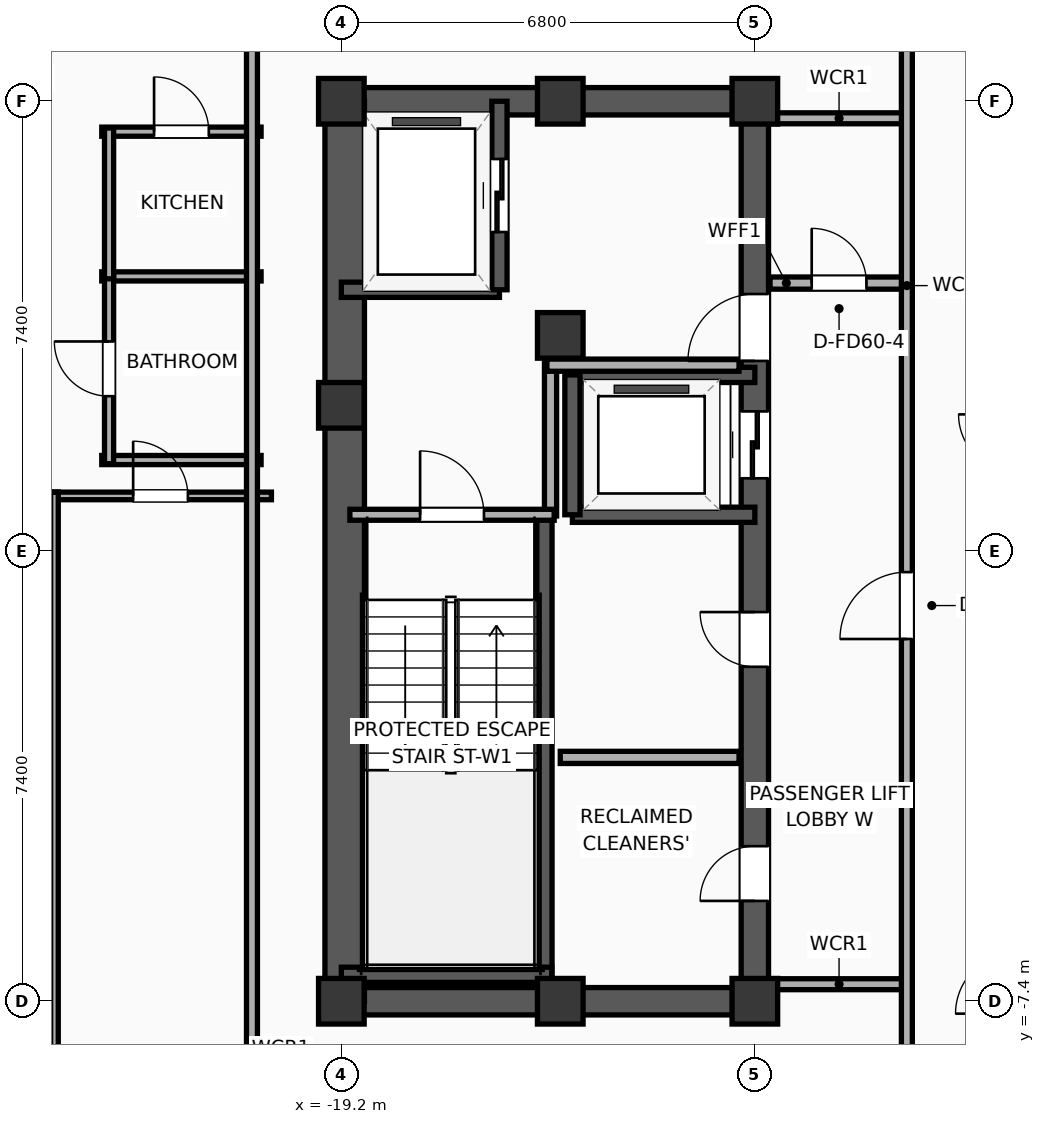
"""IFC4 building model, lengths in metres.
Left out: names, types, materials, properties, quantities, classifications, styles, units other than length and angle.
Written with IfcOpenShell. Run it as: python <this file> out.ifc"""

import sys

from ifc_helpers import new_model, si_unit, direction, frame, frame_2d, origin, origin_2d, place, context, subcontext, project, spatial, rectangle, extrude, element, fill, save


model = new_model("IFC4")
c1 = context("Model", 3, precision=1e-05, world=origin(), true_north=direction((0.0, 1.0)))
c2 = subcontext(c1, "Body", "Model", "MODEL_VIEW")
j1 = project(units=[si_unit("LENGTHUNIT", "METRE"), si_unit("PLANEANGLEUNIT", "RADIAN")], contexts=[c1])
p1 = place(None, origin())
s1 = spatial("IfcSite", under=j1, at=p1, CompositionType="ELEMENT")
p2 = place(p1, origin())
s2 = spatial("IfcBuilding", under=s1, at=p2, CompositionType="ELEMENT")
p3 = place(p2, frame((0.0, 0.0, 291.2)))
s3 = spatial("IfcBuildingStorey", under=s2, at=p3, CompositionType="ELEMENT", Elevation=291.2)
for number, where, z_axis, x_axis in (
    (1, (-19.2, -7.4, 0.0), (0.0, 0.0, 1.0), (1.0, 0.0, 0.0)),
    (2, (-19.2, 2.4, 0.0), (0.0, 0.0, 1.0), (1.0, 0.0, 0.0)),
    (3, (-19.2, 7.4, 0.0), (0.0, 0.0, 1.0), (1.0, 0.0, 0.0)),
    (4, (-15.6, -7.4, 0.0), (0.0, 0.0, 1.0), (1.0, 0.0, 0.0)),
    (5, (-15.6, 7.4, 0.0), (0.0, 0.0, 1.0), (1.0, 0.0, 0.0)),
    (6, (-12.4, -7.4, 0.0), (0.0, 0.0, 1.0), (1.0, 0.0, 0.0)),
    (7, (-15.6, 3.55, 0.0), (0.0, 0.0, 1.0), (1.0, 0.0, 0.0)),
    (8, (-12.4, 7.4, 0.0), (0.0, 0.0, 1.0), (1.0, 0.0, 0.0)),
):
    element("IfcColumn", number, at=place(p3, frame(where, z_axis=z_axis, x_axis=x_axis)), inside=s3, PredefinedType="COLUMN", context=c2, shape_type="SweptSolid", body=[
        extrude(rectangle(XDim=0.75, YDim=0.75, at=origin_2d()), origin(), (0.0, 0.0, 1.0), 3.9),
    ])
for number, where, z_axis, x_axis in (
    (9, (-19.425, -7.4, 0.0), (0.0, 0.0, 1.0), (1.0, 0.0, 0.0)),
    (10, (-19.425, 7.4, 0.0), (0.0, 0.0, 1.0), (1.0, 0.0, 0.0)),
):
    element("IfcWall", number, at=place(p3, frame(where, z_axis=z_axis, x_axis=x_axis)), inside=s3, PredefinedType="SHEAR", context=c2, shape_type="SweptSolid", body=[
        extrude(rectangle(XDim=7.25, YDim=0.45, at=frame_2d((3.625, 0.0))), origin(), (0.0, 0.0, 1.0), 3.635),
    ])
p4 = place(p3, frame((-19.145, -7.4, 0.0), z_axis=(0.0, 0.0, 1.0), x_axis=(0.0, 1.0, 0.0)))
e11 = element("IfcWall", 11, at=p4, inside=s3, PredefinedType="SHEAR", context=c2, shape_type="SweptSolid", body=[
    extrude(rectangle(XDim=14.8, YDim=0.65, at=frame_2d((7.4, 0.0))), origin(), (0.0, 0.0, 1.0), 3.635),
])
p5 = place(p3, frame((-12.4, -7.4, 0.0), z_axis=(0.0, 0.0, 1.0), x_axis=(0.0, 1.0, 0.0)))
e12 = element("IfcWall", 12, at=p5, inside=s3, PredefinedType="SHEAR", context=c2, shape_type="SweptSolid", body=[
    extrude(rectangle(XDim=14.8, YDim=0.45, at=frame_2d((7.4, 0.0))), origin(), (0.0, 0.0, 1.0), 3.635),
])
p6 = place(p5, frame((8.6, 0.0, 0.0)))
e13 = element("IfcOpeningElement", 13, at=p6, cuts=e12, PredefinedType="OPENING", context=c2, shape_type="SweptSolid", body=[
    extrude(rectangle(XDim=1.1, YDim=2.05, at=frame_2d((0.55, 1.025))), frame((0.0, 0.235, 0.0), z_axis=(0.0, -1.0, 0.0), x_axis=(1.0, 0.0, 0.0)), (0.0, 0.0, 1.0), 0.47),
])
p7 = place(p5, frame((10.53, 0.0, 0.0)))
e14 = element("IfcOpeningElement", 14, at=p7, cuts=e12, PredefinedType="OPENING", context=c2, shape_type="SweptSolid", body=[
    extrude(rectangle(XDim=1.1, YDim=2.05, at=frame_2d((0.55, 1.025))), frame((0.0, 0.235, 0.0), z_axis=(0.0, -1.0, 0.0), x_axis=(1.0, 0.0, 0.0)), (0.0, 0.0, 1.0), 0.47),
])
p8 = place(p5, frame((1.65, 0.0, 0.0)))
e15 = element("IfcOpeningElement", 15, at=p8, cuts=e12, PredefinedType="OPENING", context=c2, shape_type="SweptSolid", body=[
    extrude(rectangle(XDim=0.9, YDim=2.05, at=frame_2d((0.45, 1.025))), frame((0.0, 0.235, 0.0), z_axis=(0.0, -1.0, 0.0), x_axis=(1.0, 0.0, 0.0)), (0.0, 0.0, 1.0), 0.47),
])
p9 = place(p5, frame((5.5, 0.0, 0.0)))
e16 = element("IfcOpeningElement", 16, at=p9, cuts=e12, PredefinedType="OPENING", context=c2, shape_type="SweptSolid", body=[
    extrude(rectangle(XDim=0.9, YDim=2.05, at=frame_2d((0.45, 1.025))), frame((0.0, 0.235, 0.0), z_axis=(0.0, -1.0, 0.0), x_axis=(1.0, 0.0, 0.0)), (0.0, 0.0, 1.0), 0.47),
])
p10 = place(p3, frame((-15.86, -7.085, 0.0), z_axis=(0.0, 0.0, 1.0), x_axis=(0.0, 1.0, 0.0)))
e17 = element("IfcWall", 17, at=p10, inside=s3, PredefinedType="SOLIDWALL", context=c2, shape_type="SweptSolid", body=[
    extrude(rectangle(XDim=7.685, YDim=0.25, at=frame_2d((3.843, 0.0))), origin(), (0.0, 0.0, 1.0), 3.635),
])
p11 = place(p3, frame((-19.2, -6.965, 0.0), z_axis=(0.0, 0.0, 1.0), x_axis=(1.0, 0.0, 0.0)))
e18 = element("IfcWall", 18, at=p11, inside=s3, PredefinedType="SOLIDWALL", context=c2, shape_type="SweptSolid", body=[
    extrude(rectangle(XDim=3.46, YDim=0.25, at=frame_2d((1.73, 0.0))), origin(), (0.0, 0.0, 1.0), 3.635),
])
p12 = place(p3, frame((-19.2, 4.3, 0.0), z_axis=(0.0, 0.0, 1.0), x_axis=(1.0, 0.0, 0.0)))
e19 = element("IfcWall", 19, at=p12, inside=s3, PredefinedType="SOLIDWALL", context=c2, shape_type="SweptSolid", body=[
    extrude(rectangle(XDim=2.6, YDim=0.25, at=frame_2d((1.3, 0.0))), origin(), (0.0, 0.0, 1.0), 3.635),
])
p13 = place(p3, frame((-16.6, 4.3, 0.0), z_axis=(0.0, 0.0, 1.0), x_axis=(0.0, 1.0, 0.0)))
e20 = element("IfcWall", 20, at=p13, inside=s3, PredefinedType="SOLIDWALL", context=c2, shape_type="SweptSolid", body=[
    extrude(rectangle(XDim=3.1, YDim=0.25, at=frame_2d((1.55, 0.0))), origin(), (0.0, 0.0, 1.0), 3.635),
])
p14 = place(p13, frame((0.95, 0.0, 0.0)))
e21 = element("IfcOpeningElement", 21, at=p14, cuts=e20, PredefinedType="OPENING", context=c2, shape_type="SweptSolid", body=[
    extrude(rectangle(XDim=1.2, YDim=2.05, at=frame_2d((0.6, 1.025))), frame((0.0, 0.135, 0.0), z_axis=(0.0, -1.0, 0.0), x_axis=(1.0, 0.0, 0.0)), (0.0, 0.0, 1.0), 0.27),
])
for number, where, z_axis, x_axis in (
    (22, (-15.4, 0.6, 0.0), (0.0, 0.0, 1.0), (1.0, 0.0, 0.0)),
    (23, (-12.4, 2.9, 0.0), (0.0, 0.0, 1.0), (-1.0, 0.0, 0.0)),
):
    element("IfcWall", number, at=place(p3, frame(where, z_axis=z_axis, x_axis=x_axis)), inside=s3, PredefinedType="SOLIDWALL", context=c2, shape_type="SweptSolid", body=[
        extrude(rectangle(XDim=3.0, YDim=0.25, at=frame_2d((1.5, 0.0))), origin(), (0.0, 0.0, 1.0), 3.635),
    ])
p15 = place(p3, frame((-15.4, 2.9, 0.0), z_axis=(0.0, 0.0, 1.0), x_axis=(0.0, -1.0, 0.0)))
e24 = element("IfcWall", 24, at=p15, inside=s3, PredefinedType="SOLIDWALL", context=c2, shape_type="SweptSolid", body=[
    extrude(rectangle(XDim=2.3, YDim=0.25, at=frame_2d((1.15, 0.0))), origin(), (0.0, 0.0, 1.0), 3.635),
])
p16 = place(p3, frame((-15.76, 0.58, 0.0), z_axis=(0.0, 0.0, 1.0), x_axis=(0.0, 1.0, 0.0)))
e25 = element("IfcWall", 25, at=p16, inside=s3, PredefinedType="PARTITIONING", context=c2, shape_type="SweptSolid", body=[
    extrude(rectangle(XDim=2.52, YDim=0.2, at=frame_2d((1.26, 0.0))), origin(), (0.0, 0.0, 1.0), 3.635),
])
p17 = place(p3, frame((-15.82, 3.06, 0.0), z_axis=(0.0, 0.0, 1.0), x_axis=(1.0, 0.0, 0.0)))
e26 = element("IfcWall", 26, at=p17, inside=s3, PredefinedType="PARTITIONING", context=c2, shape_type="SweptSolid", body=[
    extrude(rectangle(XDim=3.16, YDim=0.2, at=frame_2d((1.58, 0.0))), origin(), (0.0, 0.0, 1.0), 3.635),
])
p18 = place(p3, frame((-19.06, 0.6, 0.0), z_axis=(0.0, 0.0, 1.0), x_axis=(1.0, 0.0, 0.0)))
e27 = element("IfcWall", 27, at=p18, inside=s3, PredefinedType="PARTITIONING", context=c2, shape_type="SweptSolid", body=[
    extrude(rectangle(XDim=3.36, YDim=0.18, at=frame_2d((1.68, 0.0))), origin(), (0.0, 0.0, 1.0), 3.635),
])
p19 = place(p18, frame((1.155, 0.0, 0.0)))
e28 = element("IfcOpeningElement", 28, at=p19, cuts=e27, PredefinedType="OPENING", context=c2, shape_type="SweptSolid", body=[
    extrude(rectangle(XDim=1.05, YDim=2.05, at=frame_2d((0.525, 1.025))), frame((0.0, 0.1, 0.0), z_axis=(0.0, -1.0, 0.0), x_axis=(1.0, 0.0, 0.0)), (0.0, 0.0, 1.0), 0.2),
])
p20 = place(p3, frame((-15.6, -3.39, 0.0), z_axis=(0.0, 0.0, 1.0), x_axis=(1.0, 0.0, 0.0)))
e29 = element("IfcWall", 29, at=p20, inside=s3, PredefinedType="PARTITIONING", context=c2, shape_type="SweptSolid", body=[
    extrude(rectangle(XDim=2.94, YDim=0.2, at=frame_2d((1.47, 0.0))), origin(), (0.0, 0.0, 1.0), 3.635),
])
p21 = place(p3, frame((-12.15, 4.41, 0.0), z_axis=(0.0, 0.0, 1.0), x_axis=(1.0, 0.0, 0.0)))
e30 = element("IfcWall", 30, at=p21, inside=s3, PredefinedType="PARTITIONING", context=c2, shape_type="SweptSolid", body=[
    extrude(rectangle(XDim=2.27, YDim=0.2, at=frame_2d((1.135, 0.0))), origin(), (0.0, 0.0, 1.0), 3.635),
])
p22 = place(p21, frame((0.685, 0.0, 0.0)))
e31 = element("IfcOpeningElement", 31, at=p22, cuts=e30, PredefinedType="OPENING", context=c2, shape_type="SweptSolid", body=[
    extrude(rectangle(XDim=0.9, YDim=2.05, at=frame_2d((0.45, 1.025))), frame((0.0, 0.11, 0.0), z_axis=(0.0, -1.0, 0.0), x_axis=(1.0, 0.0, 0.0)), (0.0, 0.0, 1.0), 0.22),
])
for number, where, z_axis, x_axis in (
    (32, (-12.15, 7.12, 0.0), (0.0, 0.0, 1.0), (1.0, 0.0, 0.0)),
    (33, (-12.15, -7.12, 0.0), (0.0, 0.0, 1.0), (1.0, 0.0, 0.0)),
):
    element("IfcWall", number, at=place(p3, frame(where, z_axis=z_axis, x_axis=x_axis)), inside=s3, PredefinedType="PARTITIONING", context=c2, shape_type="SweptSolid", body=[
        extrude(rectangle(XDim=2.27, YDim=0.18, at=frame_2d((1.135, 0.0))), origin(), (0.0, 0.0, 1.0), 3.635),
    ])
p23 = place(p3, frame((-9.9, -8.93, 0.0), z_axis=(0.0, 0.0, 1.0), x_axis=(0.0, 1.0, 0.0)))
e34 = element("IfcWall", 34, at=p23, inside=s3, PredefinedType="PARTITIONING", context=c2, shape_type="SweptSolid", body=[
    extrude(rectangle(XDim=17.86, YDim=0.18, at=frame_2d((8.93, 0.0))), origin(), (0.0, 0.0, 1.0), 3.635),
])
p24 = place(p23, frame((7.487, 0.0, 0.0)))
e35 = element("IfcOpeningElement", 35, at=p24, cuts=e34, PredefinedType="OPENING", context=c2, shape_type="SweptSolid", body=[
    extrude(rectangle(XDim=1.1, YDim=2.05, at=frame_2d((0.55, 1.025))), frame((0.0, 0.1, 0.0), z_axis=(0.0, -1.0, 0.0), x_axis=(1.0, 0.0, 0.0)), (0.0, 0.0, 1.0), 0.2),
])
p25 = place(p3, frame((-23.14, 6.9, 0.0), z_axis=(0.0, 0.0, 1.0), x_axis=(1.0, 0.0, 0.0)))
e36 = element("IfcWall", 36, at=p25, inside=s3, PredefinedType="PLUMBINGWALL", context=c2, shape_type="SweptSolid", body=[
    extrude(rectangle(XDim=2.62, YDim=0.15, at=frame_2d((1.31, 0.0))), origin(), (0.0, 0.0, 1.0), 3.635),
])
p26 = place(p25, frame((0.86, 0.0, 0.0)))
e37 = element("IfcOpeningElement", 37, at=p26, cuts=e36, PredefinedType="OPENING", context=c2, shape_type="SweptSolid", body=[
    extrude(rectangle(XDim=0.9, YDim=2.05, at=frame_2d((0.45, 1.025))), frame((0.0, 0.085, 0.0), z_axis=(0.0, -1.0, 0.0), x_axis=(1.0, 0.0, 0.0)), (0.0, 0.0, 1.0), 0.17),
])
for number, where, z_axis, x_axis in (
    (38, (-23.14, 4.52, 0.0), (0.0, 0.0, 1.0), (1.0, 0.0, 0.0)),
    (39, (-23.14, 1.5, 0.0), (0.0, 0.0, 1.0), (1.0, 0.0, 0.0)),
):
    element("IfcWall", number, at=place(p3, frame(where, z_axis=z_axis, x_axis=x_axis)), inside=s3, PredefinedType="PLUMBINGWALL", context=c2, shape_type="SweptSolid", body=[
        extrude(rectangle(XDim=2.62, YDim=0.15, at=frame_2d((1.31, 0.0))), origin(), (0.0, 0.0, 1.0), 3.635),
    ])
p27 = place(p3, frame((-23.02, 1.44, 0.0), z_axis=(0.0, 0.0, 1.0), x_axis=(0.0, 1.0, 0.0)))
e40 = element("IfcWall", 40, at=p27, inside=s3, PredefinedType="PLUMBINGWALL", context=c2, shape_type="SweptSolid", body=[
    extrude(rectangle(XDim=3.12, YDim=0.15, at=frame_2d((1.56, 0.0))), origin(), (0.0, 0.0, 1.0), 3.635),
])
p28 = place(p27, frame((1.11, 0.0, 0.0)))
e41 = element("IfcOpeningElement", 41, at=p28, cuts=e40, PredefinedType="OPENING", context=c2, shape_type="SweptSolid", body=[
    extrude(rectangle(XDim=0.9, YDim=2.05, at=frame_2d((0.45, 1.025))), frame((0.0, 0.085, 0.0), z_axis=(0.0, -1.0, 0.0), x_axis=(1.0, 0.0, 0.0)), (0.0, 0.0, 1.0), 0.17),
])
p29 = place(p3, frame((-23.02, 4.48, 0.0), z_axis=(0.0, 0.0, 1.0), x_axis=(0.0, 1.0, 0.0)))
e42 = element("IfcWall", 42, at=p29, inside=s3, PredefinedType="PLUMBINGWALL", context=c2, shape_type="SweptSolid", body=[
    extrude(rectangle(XDim=2.48, YDim=0.15, at=frame_2d((1.24, 0.0))), origin(), (0.0, 0.0, 1.0), 3.635),
])
p30 = place(p3, frame((-27.229, 0.91, 0.0), z_axis=(0.0, 0.0, 1.0), x_axis=(1.0, 0.0, 0.0)))
e43 = element("IfcWall", 43, at=p30, inside=s3, PredefinedType="PARTITIONING", context=c2, shape_type="SweptSolid", body=[
    extrude(rectangle(XDim=3.374, YDim=0.125, at=frame_2d((1.687, 0.0))), origin(), (0.0, 0.0, 1.0), 3.635),
])
p31 = place(p30, frame((1.237, 0.0, 0.0)))
e44 = element("IfcOpeningElement", 44, at=p31, cuts=e43, PredefinedType="OPENING", context=c2, shape_type="SweptSolid", body=[
    extrude(rectangle(XDim=0.9, YDim=2.05, at=frame_2d((0.45, 1.025))), frame((0.0, 0.073, 0.0), z_axis=(0.0, -1.0, 0.0), x_axis=(1.0, 0.0, 0.0)), (0.0, 0.0, 1.0), 0.145),
])
p32 = place(p3, frame((-23.98, 0.91, 0.0), z_axis=(0.0, 0.0, 1.0), x_axis=(1.0, 0.0, 0.0)))
e45 = element("IfcWall", 45, at=p32, inside=s3, PredefinedType="PARTITIONING", context=c2, shape_type="SweptSolid", body=[
    extrude(rectangle(XDim=3.63, YDim=0.125, at=frame_2d((1.815, 0.0))), origin(), (0.0, 0.0, 1.0), 3.635),
])
p33 = place(p32, frame((1.356, 0.0, 0.0)))
e46 = element("IfcOpeningElement", 46, at=p33, cuts=e45, PredefinedType="OPENING", context=c2, shape_type="SweptSolid", body=[
    extrude(rectangle(XDim=0.9, YDim=2.05, at=frame_2d((0.45, 1.025))), frame((0.0, 0.073, 0.0), z_axis=(0.0, -1.0, 0.0), x_axis=(1.0, 0.0, 0.0)), (0.0, 0.0, 1.0), 0.145),
])
p34 = place(p3, frame((-23.918, -9.16, 0.0), z_axis=(0.0, 0.0, 1.0), x_axis=(0.0, 1.0, 0.0)))
e47 = element("IfcWall", 47, at=p34, inside=s3, PredefinedType="PARTITIONING", context=c2, shape_type="SweptSolid", body=[
    extrude(rectangle(XDim=10.13, YDim=0.125, at=frame_2d((5.065, 0.0))), origin(), (0.0, 0.0, 1.0), 3.635),
])
p35 = place(p3, frame((-20.67, -8.96, 0.0), z_axis=(0.0, 0.0, 1.0), x_axis=(0.0, 1.0, 0.0)))
e48 = element("IfcWall", 48, at=p35, inside=s3, PredefinedType="PARTITIONING", context=c2, shape_type="SweptSolid", body=[
    extrude(rectangle(XDim=17.92, YDim=0.18, at=frame_2d((8.96, 0.0))), origin(), (0.0, 0.0, 1.0), 3.635),
])
p36 = place(p14, origin())
e49 = element("IfcDoor", 49, at=p36, inside=s3, OperationType="SLIDING_TO_LEFT", PredefinedType="DOOR", context=c2, shape_type="SweptSolid", body=[
    extrude(rectangle(XDim=1.2, YDim=2.05, at=frame_2d((0.6, 1.025))), frame((0.0, 0.025, 0.0), z_axis=(0.0, -1.0, 0.0), x_axis=(1.0, 0.0, 0.0)), (0.0, 0.0, 1.0), 0.05),
])
fill(e21, e49)
p37 = place(p6, origin())
e50 = element("IfcDoor", 50, at=p37, inside=s3, OperationType="SLIDING_TO_LEFT", PredefinedType="DOOR", context=c2, shape_type="SweptSolid", body=[
    extrude(rectangle(XDim=1.1, YDim=2.05, at=frame_2d((0.55, 1.025))), frame((0.0, 0.025, 0.0), z_axis=(0.0, -1.0, 0.0), x_axis=(1.0, 0.0, 0.0)), (0.0, 0.0, 1.0), 0.05),
])
fill(e13, e50)
p38 = place(p19, origin())
e51 = element("IfcDoor", 51, at=p38, inside=s3, OperationType="SINGLE_SWING_LEFT", PredefinedType="DOOR", context=c2, shape_type="SweptSolid", body=[
    extrude(rectangle(XDim=1.05, YDim=2.05, at=frame_2d((0.525, 1.025))), frame((0.0, 0.025, 0.0), z_axis=(0.0, -1.0, 0.0), x_axis=(1.0, 0.0, 0.0)), (0.0, 0.0, 1.0), 0.05),
])
fill(e28, e51)
p39 = place(p22, origin())
e52 = element("IfcDoor", 52, at=p39, inside=s3, OperationType="SINGLE_SWING_LEFT", PredefinedType="DOOR", context=c2, shape_type="SweptSolid", body=[
    extrude(rectangle(XDim=0.9, YDim=2.05, at=frame_2d((0.45, 1.025))), frame((0.0, 0.025, 0.0), z_axis=(0.0, -1.0, 0.0), x_axis=(1.0, 0.0, 0.0)), (0.0, 0.0, 1.0), 0.05),
])
fill(e31, e52)
p40 = place(p24, origin())
e53 = element("IfcDoor", 53, at=p40, inside=s3, OperationType="SINGLE_SWING_LEFT", PredefinedType="DOOR", context=c2, shape_type="SweptSolid", body=[
    extrude(rectangle(XDim=1.1, YDim=2.05, at=frame_2d((0.55, 1.025))), frame((0.0, 0.025, 0.0), z_axis=(0.0, -1.0, 0.0), x_axis=(1.0, 0.0, 0.0)), (0.0, 0.0, 1.0), 0.05),
])
fill(e35, e53)
p41 = place(p26, origin())
e54 = element("IfcDoor", 54, at=p41, inside=s3, OperationType="SINGLE_SWING_LEFT", PredefinedType="DOOR", context=c2, shape_type="SweptSolid", body=[
    extrude(rectangle(XDim=0.9, YDim=2.05, at=frame_2d((0.45, 1.025))), frame((0.0, 0.025, 0.0), z_axis=(0.0, -1.0, 0.0), x_axis=(1.0, 0.0, 0.0)), (0.0, 0.0, 1.0), 0.05),
])
fill(e37, e54)
p42 = place(p28, origin())
e55 = element("IfcDoor", 55, at=p42, inside=s3, OperationType="SINGLE_SWING_RIGHT", PredefinedType="DOOR", context=c2, shape_type="SweptSolid", body=[
    extrude(rectangle(XDim=0.9, YDim=2.05, at=frame_2d((0.45, 1.025))), frame((0.0, 0.025, 0.0), z_axis=(0.0, -1.0, 0.0), x_axis=(1.0, 0.0, 0.0)), (0.0, 0.0, 1.0), 0.05),
])
fill(e41, e55)
p43 = place(p33, origin())
e56 = element("IfcDoor", 56, at=p43, inside=s3, OperationType="SINGLE_SWING_LEFT", PredefinedType="DOOR", context=c2, shape_type="SweptSolid", body=[
    extrude(rectangle(XDim=0.9, YDim=2.05, at=frame_2d((0.45, 1.025))), frame((0.0, 0.025, 0.0), z_axis=(0.0, -1.0, 0.0), x_axis=(1.0, 0.0, 0.0)), (0.0, 0.0, 1.0), 0.05),
])
fill(e46, e56)
p44 = place(p7, origin())
e57 = element("IfcDoor", 57, at=p44, inside=s3, OperationType="SINGLE_SWING_LEFT", PredefinedType="DOOR", context=c2, shape_type="SweptSolid", body=[
    extrude(rectangle(XDim=1.1, YDim=2.05, at=frame_2d((0.55, 1.025))), frame((0.0, 0.025, 0.0), z_axis=(0.0, -1.0, 0.0), x_axis=(1.0, 0.0, 0.0)), (0.0, 0.0, 1.0), 0.05),
])
fill(e14, e57)
p45 = place(p8, origin())
e58 = element("IfcDoor", 58, at=p45, inside=s3, OperationType="SINGLE_SWING_LEFT", PredefinedType="DOOR", context=c2, shape_type="SweptSolid", body=[
    extrude(rectangle(XDim=0.9, YDim=2.05, at=frame_2d((0.45, 1.025))), frame((0.0, 0.025, 0.0), z_axis=(0.0, -1.0, 0.0), x_axis=(1.0, 0.0, 0.0)), (0.0, 0.0, 1.0), 0.05),
])
fill(e15, e58)
p46 = place(p9, origin())
e59 = element("IfcDoor", 59, at=p46, inside=s3, OperationType="SINGLE_SWING_RIGHT", PredefinedType="DOOR", context=c2, shape_type="SweptSolid", body=[
    extrude(rectangle(XDim=0.9, YDim=2.05, at=frame_2d((0.45, 1.025))), frame((0.0, 0.025, 0.0), z_axis=(0.0, -1.0, 0.0), x_axis=(1.0, 0.0, 0.0)), (0.0, 0.0, 1.0), 0.05),
])
fill(e16, e59)
save(model, sys.argv[1])
